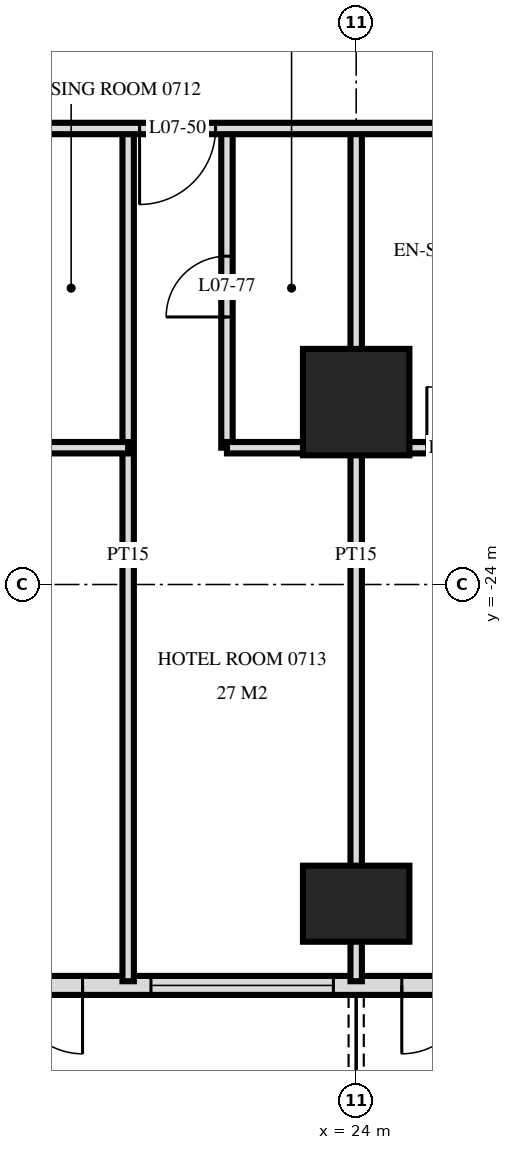
"""IFC4 building model, lengths in metres.
Left out: names, types, materials, properties, quantities, classifications, styles, units other than length and angle.
Written with IfcOpenShell. Run it as: python <this file> out.ifc"""

import sys

from ifc_helpers import new_model, si_unit, direction, frame, frame_2d, origin, origin_2d, place, context, subcontext, project, spatial, rectangle, extrude, element, fill, save


model = new_model("IFC4")
c1 = context("Model", 3, precision=1e-05, world=origin(), true_north=direction((0.0, 1.0)))
c2 = subcontext(c1, "Body", "Model", "MODEL_VIEW")
j1 = project(units=[si_unit("LENGTHUNIT", "METRE"), si_unit("PLANEANGLEUNIT", "RADIAN")], contexts=[c1])
p1 = place(None, origin())
s1 = spatial("IfcSite", under=j1, at=p1, CompositionType="ELEMENT")
p2 = place(p1, origin())
s2 = spatial("IfcBuilding", under=s1, at=p2, CompositionType="ELEMENT")
p3 = place(p2, frame((0.0, 0.0, 34.8)))
s3 = spatial("IfcBuildingStorey", under=s2, at=p3, CompositionType="ELEMENT", Elevation=34.8)
p4 = place(p3, frame((24.0, -28.2, 0.0), z_axis=(0.0, 0.0, 1.0), x_axis=(1.0, 0.0, 0.0)))
e1 = element("IfcColumn", 1, at=p4, inside=s3, PredefinedType="COLUMN", context=c2, shape_type="SweptSolid", body=[
    extrude(rectangle(XDim=1.4, YDim=1.0, at=origin_2d()), origin(), (0.0, 0.0, 1.0), 3.6),
])
p5 = place(p3, frame((24.0, -21.6, 0.0), z_axis=(0.0, 0.0, 1.0), x_axis=(1.0, 0.0, 0.0)))
e2 = element("IfcColumn", 2, at=p5, inside=s3, PredefinedType="COLUMN", context=c2, shape_type="SweptSolid", body=[
    extrude(rectangle(XDim=1.4, YDim=1.4, at=origin_2d()), origin(), (0.0, 0.0, 1.0), 3.6),
])
p6 = place(p3, frame((-28.775, -29.275, 0.0), z_axis=(0.0, 0.0, 1.0), x_axis=(1.0, 0.0, 0.0)))
e3 = element("IfcWall", 3, at=p6, inside=s3, PredefinedType="SOLIDWALL", context=c2, shape_type="SweptSolid", body=[
    extrude(rectangle(XDim=57.551, YDim=0.25, at=frame_2d((28.775, 0.0))), origin(), (0.0, 0.0, 1.0), 3.32),
])
p7 = place(p6, frame((0.575, 0.0, 0.0)))
e4 = element("IfcOpeningElement", 4, at=p7, cuts=e3, PredefinedType="OPENING", context=c2, shape_type="SweptSolid", body=[
    extrude(rectangle(XDim=1.8, YDim=2.4, at=frame_2d((0.9, 1.2))), frame((0.0, 0.135, 0.0), z_axis=(0.0, -1.0, 0.0), x_axis=(1.0, 0.0, 0.0)), (0.0, 0.0, 1.0), 0.27),
])
p8 = place(p6, frame((5.375, 0.0, 0.0)))
e5 = element("IfcOpeningElement", 5, at=p8, cuts=e3, PredefinedType="OPENING", context=c2, shape_type="SweptSolid", body=[
    extrude(rectangle(XDim=1.8, YDim=2.4, at=frame_2d((0.9, 1.2))), frame((0.0, 0.135, 0.0), z_axis=(0.0, -1.0, 0.0), x_axis=(1.0, 0.0, 0.0)), (0.0, 0.0, 1.0), 0.27),
])
p9 = place(p6, frame((8.075, 0.0, 0.3)))
e6 = element("IfcOpeningElement", 6, at=p9, cuts=e3, PredefinedType="OPENING", context=c2, shape_type="SweptSolid", body=[
    extrude(rectangle(XDim=2.4, YDim=2.1, at=frame_2d((1.2, 1.05))), frame((0.0, 0.135, 0.0), z_axis=(0.0, -1.0, 0.0), x_axis=(1.0, 0.0, 0.0)), (0.0, 0.0, 1.0), 0.27),
])
p10 = place(p6, frame((11.375, 0.0, 0.0)))
e7 = element("IfcOpeningElement", 7, at=p10, cuts=e3, PredefinedType="OPENING", context=c2, shape_type="SweptSolid", body=[
    extrude(rectangle(XDim=1.8, YDim=2.4, at=frame_2d((0.9, 1.2))), frame((0.0, 0.135, 0.0), z_axis=(0.0, -1.0, 0.0), x_axis=(1.0, 0.0, 0.0)), (0.0, 0.0, 1.0), 0.27),
])
p11 = place(p6, frame((14.075, 0.0, 0.3)))
e8 = element("IfcOpeningElement", 8, at=p11, cuts=e3, PredefinedType="OPENING", context=c2, shape_type="SweptSolid", body=[
    extrude(rectangle(XDim=2.4, YDim=2.1, at=frame_2d((1.2, 1.05))), frame((0.0, 0.135, 0.0), z_axis=(0.0, -1.0, 0.0), x_axis=(1.0, 0.0, 0.0)), (0.0, 0.0, 1.0), 0.27),
])
p12 = place(p6, frame((17.375, 0.0, 0.0)))
e9 = element("IfcOpeningElement", 9, at=p12, cuts=e3, PredefinedType="OPENING", context=c2, shape_type="SweptSolid", body=[
    extrude(rectangle(XDim=1.8, YDim=2.4, at=frame_2d((0.9, 1.2))), frame((0.0, 0.135, 0.0), z_axis=(0.0, -1.0, 0.0), x_axis=(1.0, 0.0, 0.0)), (0.0, 0.0, 1.0), 0.27),
])
p13 = place(p6, frame((20.075, 0.0, 0.3)))
e10 = element("IfcOpeningElement", 10, at=p13, cuts=e3, PredefinedType="OPENING", context=c2, shape_type="SweptSolid", body=[
    extrude(rectangle(XDim=2.4, YDim=2.1, at=frame_2d((1.2, 1.05))), frame((0.0, 0.135, 0.0), z_axis=(0.0, -1.0, 0.0), x_axis=(1.0, 0.0, 0.0)), (0.0, 0.0, 1.0), 0.27),
])
p14 = place(p6, frame((23.075, 0.0, 0.3)))
e11 = element("IfcOpeningElement", 11, at=p14, cuts=e3, PredefinedType="OPENING", context=c2, shape_type="SweptSolid", body=[
    extrude(rectangle(XDim=2.4, YDim=2.1, at=frame_2d((1.2, 1.05))), frame((0.0, 0.135, 0.0), z_axis=(0.0, -1.0, 0.0), x_axis=(1.0, 0.0, 0.0)), (0.0, 0.0, 1.0), 0.27),
])
p15 = place(p6, frame((26.375, 0.0, 0.0)))
e12 = element("IfcOpeningElement", 12, at=p15, cuts=e3, PredefinedType="OPENING", context=c2, shape_type="SweptSolid", body=[
    extrude(rectangle(XDim=1.8, YDim=2.4, at=frame_2d((0.9, 1.2))), frame((0.0, 0.135, 0.0), z_axis=(0.0, -1.0, 0.0), x_axis=(1.0, 0.0, 0.0)), (0.0, 0.0, 1.0), 0.27),
])
p16 = place(p6, frame((29.375, 0.0, 0.0)))
e13 = element("IfcOpeningElement", 13, at=p16, cuts=e3, PredefinedType="OPENING", context=c2, shape_type="SweptSolid", body=[
    extrude(rectangle(XDim=1.8, YDim=2.4, at=frame_2d((0.9, 1.2))), frame((0.0, 0.135, 0.0), z_axis=(0.0, -1.0, 0.0), x_axis=(1.0, 0.0, 0.0)), (0.0, 0.0, 1.0), 0.27),
])
p17 = place(p6, frame((32.075, 0.0, 0.3)))
e14 = element("IfcOpeningElement", 14, at=p17, cuts=e3, PredefinedType="OPENING", context=c2, shape_type="SweptSolid", body=[
    extrude(rectangle(XDim=2.4, YDim=2.1, at=frame_2d((1.2, 1.05))), frame((0.0, 0.135, 0.0), z_axis=(0.0, -1.0, 0.0), x_axis=(1.0, 0.0, 0.0)), (0.0, 0.0, 1.0), 0.27),
])
p18 = place(p6, frame((35.375, 0.0, 0.0)))
e15 = element("IfcOpeningElement", 15, at=p18, cuts=e3, PredefinedType="OPENING", context=c2, shape_type="SweptSolid", body=[
    extrude(rectangle(XDim=1.8, YDim=2.4, at=frame_2d((0.9, 1.2))), frame((0.0, 0.135, 0.0), z_axis=(0.0, -1.0, 0.0), x_axis=(1.0, 0.0, 0.0)), (0.0, 0.0, 1.0), 0.27),
])
p19 = place(p6, frame((38.075, 0.0, 0.3)))
e16 = element("IfcOpeningElement", 16, at=p19, cuts=e3, PredefinedType="OPENING", context=c2, shape_type="SweptSolid", body=[
    extrude(rectangle(XDim=2.4, YDim=2.1, at=frame_2d((1.2, 1.05))), frame((0.0, 0.135, 0.0), z_axis=(0.0, -1.0, 0.0), x_axis=(1.0, 0.0, 0.0)), (0.0, 0.0, 1.0), 0.27),
])
p20 = place(p6, frame((41.375, 0.0, 0.0)))
e17 = element("IfcOpeningElement", 17, at=p20, cuts=e3, PredefinedType="OPENING", context=c2, shape_type="SweptSolid", body=[
    extrude(rectangle(XDim=1.8, YDim=2.4, at=frame_2d((0.9, 1.2))), frame((0.0, 0.135, 0.0), z_axis=(0.0, -1.0, 0.0), x_axis=(1.0, 0.0, 0.0)), (0.0, 0.0, 1.0), 0.27),
])
p21 = place(p6, frame((44.075, 0.0, 0.3)))
e18 = element("IfcOpeningElement", 18, at=p21, cuts=e3, PredefinedType="OPENING", context=c2, shape_type="SweptSolid", body=[
    extrude(rectangle(XDim=2.4, YDim=2.1, at=frame_2d((1.2, 1.05))), frame((0.0, 0.135, 0.0), z_axis=(0.0, -1.0, 0.0), x_axis=(1.0, 0.0, 0.0)), (0.0, 0.0, 1.0), 0.27),
])
p22 = place(p6, frame((47.375, 0.0, 0.0)))
e19 = element("IfcOpeningElement", 19, at=p22, cuts=e3, PredefinedType="OPENING", context=c2, shape_type="SweptSolid", body=[
    extrude(rectangle(XDim=1.8, YDim=2.4, at=frame_2d((0.9, 1.2))), frame((0.0, 0.135, 0.0), z_axis=(0.0, -1.0, 0.0), x_axis=(1.0, 0.0, 0.0)), (0.0, 0.0, 1.0), 0.27),
])
p23 = place(p6, frame((50.075, 0.0, 0.3)))
e20 = element("IfcOpeningElement", 20, at=p23, cuts=e3, PredefinedType="OPENING", context=c2, shape_type="SweptSolid", body=[
    extrude(rectangle(XDim=2.4, YDim=2.1, at=frame_2d((1.2, 1.05))), frame((0.0, 0.135, 0.0), z_axis=(0.0, -1.0, 0.0), x_axis=(1.0, 0.0, 0.0)), (0.0, 0.0, 1.0), 0.27),
])
p24 = place(p6, frame((53.375, 0.0, 0.0)))
e21 = element("IfcOpeningElement", 21, at=p24, cuts=e3, PredefinedType="OPENING", context=c2, shape_type="SweptSolid", body=[
    extrude(rectangle(XDim=1.8, YDim=2.4, at=frame_2d((0.9, 1.2))), frame((0.0, 0.135, 0.0), z_axis=(0.0, -1.0, 0.0), x_axis=(1.0, 0.0, 0.0)), (0.0, 0.0, 1.0), 0.27),
])
p25 = place(p3, frame((24.0, -29.22, 0.0), z_axis=(0.0, 0.0, 1.0), x_axis=(0.0, 1.0, 0.0)))
e22 = element("IfcWall", 22, at=p25, inside=s3, PredefinedType="PARTITIONING", context=c2, shape_type="SweptSolid", body=[
    extrude(rectangle(XDim=11.22, YDim=0.15, at=frame_2d((5.61, 0.0))), origin(), (0.0, 0.0, 1.0), 3.32),
])
p26 = place(p3, frame((22.3, -22.2, 0.0), z_axis=(0.0, 0.0, 1.0), x_axis=(0.0, 1.0, 0.0)))
e23 = element("IfcWall", 23, at=p26, inside=s3, PredefinedType="PARTITIONING", context=c2, shape_type="SweptSolid", body=[
    extrude(rectangle(XDim=4.2, YDim=0.15, at=frame_2d((2.1, 0.0))), origin(), (0.0, 0.0, 1.0), 3.32),
])
p27 = place(p26, frame((1.72, 0.0, 0.0)))
e24 = element("IfcOpeningElement", 24, at=p27, cuts=e23, PredefinedType="OPENING", context=c2, shape_type="SweptSolid", body=[
    extrude(rectangle(XDim=0.8, YDim=2.1, at=frame_2d((0.4, 1.05))), frame((0.0, 0.085, 0.0), z_axis=(0.0, -1.0, 0.0), x_axis=(1.0, 0.0, 0.0)), (0.0, 0.0, 1.0), 0.17),
])
p28 = place(p3, frame((21.0, -29.22, 0.0), z_axis=(0.0, 0.0, 1.0), x_axis=(0.0, 1.0, 0.0)))
e25 = element("IfcWall", 25, at=p28, inside=s3, PredefinedType="PARTITIONING", context=c2, shape_type="SweptSolid", body=[
    extrude(rectangle(XDim=11.22, YDim=0.15, at=frame_2d((5.61, 0.0))), origin(), (0.0, 0.0, 1.0), 3.32),
])
p29 = place(p3, frame((19.5, -22.2, 0.0), z_axis=(0.0, 0.0, 1.0), x_axis=(1.0, 0.0, 0.0)))
e26 = element("IfcWall", 26, at=p29, inside=s3, PredefinedType="PARTITIONING", context=c2, shape_type="SweptSolid", body=[
    extrude(rectangle(XDim=1.5, YDim=0.15, at=frame_2d((0.75, 0.0))), origin(), (0.0, 0.0, 1.0), 3.32),
])
p30 = place(p3, frame((22.3, -22.2, 0.0), z_axis=(0.0, 0.0, 1.0), x_axis=(1.0, 0.0, 0.0)))
e27 = element("IfcWall", 27, at=p30, inside=s3, PredefinedType="PARTITIONING", context=c2, shape_type="SweptSolid", body=[
    extrude(rectangle(XDim=5.9, YDim=0.15, at=frame_2d((2.95, 0.0))), origin(), (0.0, 0.0, 1.0), 3.32),
])
p31 = place(p30, frame((2.63, 0.0, 0.0)))
e28 = element("IfcOpeningElement", 28, at=p31, cuts=e27, PredefinedType="OPENING", context=c2, shape_type="SweptSolid", body=[
    extrude(rectangle(XDim=0.8, YDim=2.1, at=frame_2d((0.4, 1.05))), frame((0.0, 0.085, 0.0), z_axis=(0.0, -1.0, 0.0), x_axis=(1.0, 0.0, 0.0)), (0.0, 0.0, 1.0), 0.17),
])
p32 = place(p3, frame((-33.12, -18.0, 0.0), z_axis=(0.0, 0.0, 1.0), x_axis=(1.0, 0.0, 0.0)))
e29 = element("IfcWall", 29, at=p32, inside=s3, PredefinedType="PARTITIONING", context=c2, shape_type="SweptSolid", body=[
    extrude(rectangle(XDim=66.24, YDim=0.15, at=frame_2d((33.12, 0.0))), origin(), (0.0, 0.0, 1.0), 3.32),
])
p33 = place(p32, frame((12.27, 0.0, 0.0)))
e30 = element("IfcOpeningElement", 30, at=p33, cuts=e29, PredefinedType="OPENING", context=c2, shape_type="SweptSolid", body=[
    extrude(rectangle(XDim=1.0, YDim=2.1, at=frame_2d((0.5, 1.05))), frame((0.0, 0.085, 0.0), z_axis=(0.0, -1.0, 0.0), x_axis=(1.0, 0.0, 0.0)), (0.0, 0.0, 1.0), 0.17),
])
p34 = place(p32, frame((16.97, 0.0, 0.0)))
e31 = element("IfcOpeningElement", 31, at=p34, cuts=e29, PredefinedType="OPENING", context=c2, shape_type="SweptSolid", body=[
    extrude(rectangle(XDim=1.0, YDim=2.1, at=frame_2d((0.5, 1.05))), frame((0.0, 0.085, 0.0), z_axis=(0.0, -1.0, 0.0), x_axis=(1.0, 0.0, 0.0)), (0.0, 0.0, 1.0), 0.17),
])
p35 = place(p32, frame((18.27, 0.0, 0.0)))
e32 = element("IfcOpeningElement", 32, at=p35, cuts=e29, PredefinedType="OPENING", context=c2, shape_type="SweptSolid", body=[
    extrude(rectangle(XDim=1.0, YDim=2.1, at=frame_2d((0.5, 1.05))), frame((0.0, 0.085, 0.0), z_axis=(0.0, -1.0, 0.0), x_axis=(1.0, 0.0, 0.0)), (0.0, 0.0, 1.0), 0.17),
])
p36 = place(p32, frame((22.97, 0.0, 0.0)))
e33 = element("IfcOpeningElement", 33, at=p36, cuts=e29, PredefinedType="OPENING", context=c2, shape_type="SweptSolid", body=[
    extrude(rectangle(XDim=1.0, YDim=2.1, at=frame_2d((0.5, 1.05))), frame((0.0, 0.085, 0.0), z_axis=(0.0, -1.0, 0.0), x_axis=(1.0, 0.0, 0.0)), (0.0, 0.0, 1.0), 0.17),
])
p37 = place(p32, frame((24.27, 0.0, 0.0)))
e34 = element("IfcOpeningElement", 34, at=p37, cuts=e29, PredefinedType="OPENING", context=c2, shape_type="SweptSolid", body=[
    extrude(rectangle(XDim=1.0, YDim=2.1, at=frame_2d((0.5, 1.05))), frame((0.0, 0.085, 0.0), z_axis=(0.0, -1.0, 0.0), x_axis=(1.0, 0.0, 0.0)), (0.0, 0.0, 1.0), 0.17),
])
p38 = place(p32, frame((28.97, 0.0, 0.0)))
e35 = element("IfcOpeningElement", 35, at=p38, cuts=e29, PredefinedType="OPENING", context=c2, shape_type="SweptSolid", body=[
    extrude(rectangle(XDim=1.0, YDim=2.1, at=frame_2d((0.5, 1.05))), frame((0.0, 0.085, 0.0), z_axis=(0.0, -1.0, 0.0), x_axis=(1.0, 0.0, 0.0)), (0.0, 0.0, 1.0), 0.17),
])
p39 = place(p32, frame((30.27, 0.0, 0.0)))
e36 = element("IfcOpeningElement", 36, at=p39, cuts=e29, PredefinedType="OPENING", context=c2, shape_type="SweptSolid", body=[
    extrude(rectangle(XDim=1.0, YDim=2.1, at=frame_2d((0.5, 1.05))), frame((0.0, 0.085, 0.0), z_axis=(0.0, -1.0, 0.0), x_axis=(1.0, 0.0, 0.0)), (0.0, 0.0, 1.0), 0.17),
])
p40 = place(p32, frame((34.97, 0.0, 0.0)))
e37 = element("IfcOpeningElement", 37, at=p40, cuts=e29, PredefinedType="OPENING", context=c2, shape_type="SweptSolid", body=[
    extrude(rectangle(XDim=1.0, YDim=2.1, at=frame_2d((0.5, 1.05))), frame((0.0, 0.085, 0.0), z_axis=(0.0, -1.0, 0.0), x_axis=(1.0, 0.0, 0.0)), (0.0, 0.0, 1.0), 0.17),
])
p41 = place(p32, frame((37.27, 0.0, 0.0)))
e38 = element("IfcOpeningElement", 38, at=p41, cuts=e29, PredefinedType="OPENING", context=c2, shape_type="SweptSolid", body=[
    extrude(rectangle(XDim=1.0, YDim=2.1, at=frame_2d((0.5, 1.05))), frame((0.0, 0.085, 0.0), z_axis=(0.0, -1.0, 0.0), x_axis=(1.0, 0.0, 0.0)), (0.0, 0.0, 1.0), 0.17),
])
p42 = place(p32, frame((43.97, 0.0, 0.0)))
e39 = element("IfcOpeningElement", 39, at=p42, cuts=e29, PredefinedType="OPENING", context=c2, shape_type="SweptSolid", body=[
    extrude(rectangle(XDim=1.0, YDim=2.1, at=frame_2d((0.5, 1.05))), frame((0.0, 0.085, 0.0), z_axis=(0.0, -1.0, 0.0), x_axis=(1.0, 0.0, 0.0)), (0.0, 0.0, 1.0), 0.17),
])
p43 = place(p32, frame((45.27, 0.0, 0.0)))
e40 = element("IfcOpeningElement", 40, at=p43, cuts=e29, PredefinedType="OPENING", context=c2, shape_type="SweptSolid", body=[
    extrude(rectangle(XDim=1.0, YDim=2.1, at=frame_2d((0.5, 1.05))), frame((0.0, 0.085, 0.0), z_axis=(0.0, -1.0, 0.0), x_axis=(1.0, 0.0, 0.0)), (0.0, 0.0, 1.0), 0.17),
])
p44 = place(p32, frame((51.22, 0.0, 0.0)))
e41 = element("IfcOpeningElement", 41, at=p44, cuts=e29, PredefinedType="OPENING", context=c2, shape_type="SweptSolid", body=[
    extrude(rectangle(XDim=1.0, YDim=2.1, at=frame_2d((0.5, 1.05))), frame((0.0, 0.085, 0.0), z_axis=(0.0, -1.0, 0.0), x_axis=(1.0, 0.0, 0.0)), (0.0, 0.0, 1.0), 0.17),
])
p45 = place(p32, frame((54.27, 0.0, 0.0)))
e42 = element("IfcOpeningElement", 42, at=p45, cuts=e29, PredefinedType="OPENING", context=c2, shape_type="SweptSolid", body=[
    extrude(rectangle(XDim=1.0, YDim=2.1, at=frame_2d((0.5, 1.05))), frame((0.0, 0.085, 0.0), z_axis=(0.0, -1.0, 0.0), x_axis=(1.0, 0.0, 0.0)), (0.0, 0.0, 1.0), 0.17),
])
p46 = place(p32, frame((6.07, 0.0, 0.0)))
e43 = element("IfcOpeningElement", 43, at=p46, cuts=e29, PredefinedType="OPENING", context=c2, shape_type="SweptSolid", body=[
    extrude(rectangle(XDim=1.0, YDim=2.1, at=frame_2d((0.5, 1.05))), frame((0.0, 0.085, 0.0), z_axis=(0.0, -1.0, 0.0), x_axis=(1.0, 0.0, 0.0)), (0.0, 0.0, 1.0), 0.17),
])
p47 = place(p32, frame((63.37, 0.0, 0.0)))
e44 = element("IfcOpeningElement", 44, at=p47, cuts=e29, PredefinedType="OPENING", context=c2, shape_type="SweptSolid", body=[
    extrude(rectangle(XDim=1.0, YDim=2.1, at=frame_2d((0.5, 1.05))), frame((0.0, 0.085, 0.0), z_axis=(0.0, -1.0, 0.0), x_axis=(1.0, 0.0, 0.0)), (0.0, 0.0, 1.0), 0.17),
])
p48 = place(p22, frame((0.9, 0.0, 0.0), z_axis=(0.0, 0.0, 1.0), x_axis=(-1.0, 0.0, 0.0)))
e45 = element("IfcDoor", 45, at=p48, inside=s3, OperationType="DOUBLE_DOOR_SINGLE_SWING", PredefinedType="DOOR", context=c2, shape_type="SweptSolid", body=[
    extrude(rectangle(XDim=1.8, YDim=2.4, at=frame_2d((0.0, 1.2))), frame((0.0, -0.025, 0.0), z_axis=(0.0, 1.0, 0.0), x_axis=(-1.0, 0.0, 0.0)), (0.0, 0.0, 1.0), 0.05),
])
fill(e19, e45)
p49 = place(p23, origin())
e46 = element("IfcWindow", 46, at=p49, inside=s3, PartitioningType="SINGLE_PANEL", PredefinedType="WINDOW", context=c2, shape_type="SweptSolid", body=[
    extrude(rectangle(XDim=2.4, YDim=2.1, at=frame_2d((1.2, 1.05))), frame((0.0, 0.03, 0.0), z_axis=(0.0, -1.0, 0.0), x_axis=(1.0, 0.0, 0.0)), (0.0, 0.0, 1.0), 0.06),
])
fill(e20, e46)
p50 = place(p24, frame((0.9, 0.0, 0.0), z_axis=(0.0, 0.0, 1.0), x_axis=(-1.0, 0.0, 0.0)))
e47 = element("IfcDoor", 47, at=p50, inside=s3, OperationType="DOUBLE_DOOR_SINGLE_SWING", PredefinedType="DOOR", context=c2, shape_type="SweptSolid", body=[
    extrude(rectangle(XDim=1.8, YDim=2.4, at=frame_2d((0.0, 1.2))), frame((0.0, -0.025, 0.0), z_axis=(0.0, 1.0, 0.0), x_axis=(-1.0, 0.0, 0.0)), (0.0, 0.0, 1.0), 0.05),
])
fill(e21, e47)
p51 = place(p45, frame((0.5, 0.0, 0.0), z_axis=(0.0, 0.0, 1.0), x_axis=(-1.0, 0.0, 0.0)))
e48 = element("IfcDoor", 48, at=p51, inside=s3, OperationType="SINGLE_SWING_LEFT", PredefinedType="DOOR", context=c2, shape_type="SweptSolid", body=[
    extrude(rectangle(XDim=1.0, YDim=2.1, at=frame_2d((0.0, 1.05))), frame((0.0, -0.025, 0.0), z_axis=(0.0, 1.0, 0.0), x_axis=(-1.0, 0.0, 0.0)), (0.0, 0.0, 1.0), 0.05),
])
fill(e42, e48)
p52 = place(p27, origin())
e49 = element("IfcDoor", 49, at=p52, inside=s3, OperationType="SINGLE_SWING_RIGHT", PredefinedType="DOOR", context=c2, shape_type="SweptSolid", body=[
    extrude(rectangle(XDim=0.8, YDim=2.1, at=frame_2d((0.4, 1.05))), frame((0.0, 0.025, 0.0), z_axis=(0.0, -1.0, 0.0), x_axis=(1.0, 0.0, 0.0)), (0.0, 0.0, 1.0), 0.05),
])
fill(e24, e49)
p53 = place(p31, origin())
e50 = element("IfcDoor", 50, at=p53, inside=s3, OperationType="SINGLE_SWING_RIGHT", PredefinedType="DOOR", context=c2, shape_type="SweptSolid", body=[
    extrude(rectangle(XDim=0.8, YDim=2.1, at=frame_2d((0.4, 1.05))), frame((0.0, 0.025, 0.0), z_axis=(0.0, -1.0, 0.0), x_axis=(1.0, 0.0, 0.0)), (0.0, 0.0, 1.0), 0.05),
])
fill(e28, e50)
save(model, sys.argv[1])
